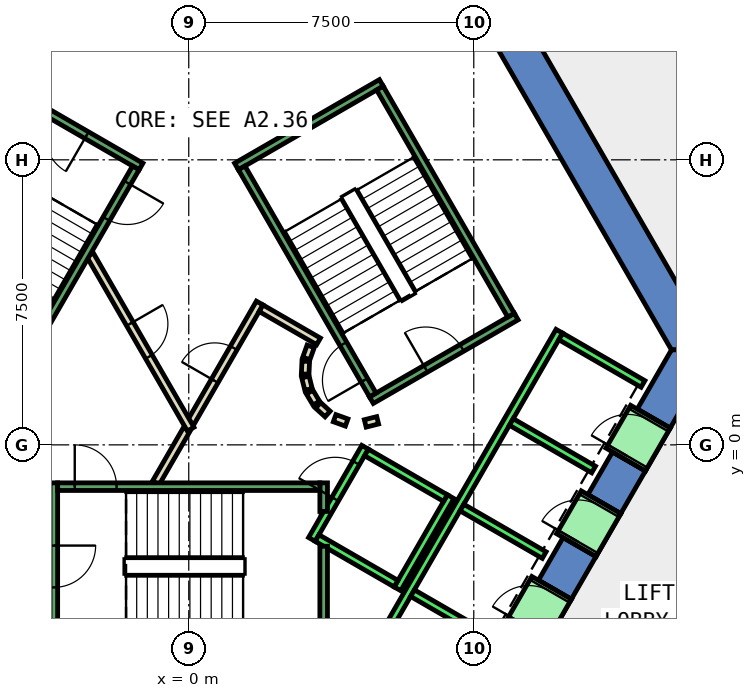
"""IFC4 building model, lengths in metres.
Left out: names, types, materials, properties, quantities, classifications, styles, units other than length and angle.
Written with IfcOpenShell. Run it as: python <this file> out.ifc"""

import sys

from ifc_helpers import new_model, si_unit, direction, frame, frame_2d, origin, place, context, subcontext, project, spatial, polyline, rectangle, outline, extrude, element, fill, save


model = new_model("IFC4")
c1 = context("Model", 3, precision=1e-05, world=origin(), true_north=direction((0.0, 1.0)))
c2 = subcontext(c1, "Body", "Model", "MODEL_VIEW")
j1 = project(units=[si_unit("LENGTHUNIT", "METRE"), si_unit("PLANEANGLEUNIT", "RADIAN")], contexts=[c1])
p1 = place(None, origin())
s1 = spatial("IfcSite", under=j1, at=p1, CompositionType="ELEMENT")
p2 = place(p1, origin())
s2 = spatial("IfcBuilding", under=s1, at=p2, CompositionType="ELEMENT")
p3 = place(p2, frame((0.0, 0.0, 176.0)))
s3 = spatial("IfcBuildingStorey", under=s2, at=p3, CompositionType="ELEMENT", Elevation=176.0)
p4 = place(p3, frame((0.0, 0.0, -0.4)))
e1 = element("IfcWall", 1, at=p4, inside=s3, PredefinedType="SHEAR", context=c2, shape_type="SweptSolid", body=[
    extrude(outline(polyline([(8.517, 11.748), (7.651, 11.248), (12.702, 2.5), (13.856, 2.5), (8.517, 11.748)])), origin(), (0.0, 0.0, 1.0), 4.2),
])
p5 = place(p3, frame((0.0, 0.0, -0.4)))
e2 = element("IfcWall", 2, at=p5, inside=s3, PredefinedType="SHEAR", context=c2, shape_type="SweptSolid", body=[
    extrude(outline(polyline([(10.717, -2.937), (9.851, -2.437), (9.201, -3.563), (10.067, -4.063), (10.717, -2.937)])), origin(), (0.0, 0.0, 1.0), 4.2),
])
p6 = place(p3, frame((0.0, 0.0, -0.4)))
e3 = element("IfcWall", 3, at=p6, inside=s3, PredefinedType="SHEAR", context=c2, shape_type="SweptSolid", body=[
    extrude(outline(polyline([(12.017, -0.686), (11.151, -0.186), (10.501, -1.311), (11.367, -1.811), (12.017, -0.686)])), origin(), (0.0, 0.0, 1.0), 4.2),
])
p7 = place(p3, frame((0.0, 0.0, -0.4)))
e4 = element("IfcWall", 4, at=p7, inside=s3, PredefinedType="SHEAR", context=c2, shape_type="SweptSolid", body=[
    extrude(outline(polyline([(11.801, 0.94), (12.667, 0.44), (13.856, 2.5), (12.702, 2.5), (11.801, 0.94)])), origin(), (0.0, 0.0, 1.0), 4.2),
])
p8 = place(p3, frame((0.0, 0.0, 3.6)))
e5 = element("IfcWall", 5, at=p8, inside=s3, PredefinedType="SHEAR", context=c2, shape_type="SweptSolid", body=[
    extrude(outline(polyline([(10.067, -4.063), (9.201, -3.563), (8.551, -4.689), (9.417, -5.189), (10.067, -4.063)])), origin(), (0.0, 0.0, 1.0), 0.2),
])
p9 = place(p3, frame((0.0, 0.0, 3.6)))
e6 = element("IfcWall", 6, at=p9, inside=s3, PredefinedType="SHEAR", context=c2, shape_type="SweptSolid", body=[
    extrude(outline(polyline([(11.367, -1.811), (10.501, -1.311), (9.851, -2.437), (10.717, -2.937), (11.367, -1.811)])), origin(), (0.0, 0.0, 1.0), 0.2),
])
p10 = place(p3, frame((0.0, 0.0, 3.6)))
e7 = element("IfcWall", 7, at=p10, inside=s3, PredefinedType="SHEAR", context=c2, shape_type="SweptSolid", body=[
    extrude(outline(polyline([(12.667, 0.44), (11.801, 0.94), (11.151, -0.186), (12.017, -0.686), (12.667, 0.44)])), origin(), (0.0, 0.0, 1.0), 0.2),
])
p11 = place(p3, frame((-0.866, -1.0, 0.0), z_axis=(0.0, 0.0, 1.0), x_axis=(0.500033287521, 0.866006184372, 0.0)))
e8 = element("IfcWall", 8, at=p11, inside=s3, PredefinedType="PARTITIONING", context=c2, shape_type="SweptSolid", body=[
    extrude(rectangle(XDim=1.632, YDim=0.2, at=frame_2d((0.816, 0.0))), origin(), (0.0, 0.0, 1.0), 3.75),
])
p12 = place(p3, frame((0.05, 0.587, 0.0), z_axis=(0.0, 0.0, 1.0), x_axis=(0.500028932171, 0.866008699143, 0.0)))
e9 = element("IfcWall", 9, at=p12, inside=s3, PredefinedType="PARTITIONING", context=c2, shape_type="SweptSolid", body=[
    extrude(rectangle(XDim=3.632, YDim=0.2, at=frame_2d((1.816, 0.0))), origin(), (0.0, 0.0, 1.0), 3.75),
])
p13 = place(p12, frame((1.266, 0.0, 0.0)))
e10 = element("IfcOpeningElement", 10, at=p13, cuts=e9, PredefinedType="OPENING", context=c2, shape_type="SweptSolid", body=[
    extrude(rectangle(XDim=1.0, YDim=2.1, at=frame_2d((0.5, 1.05))), frame((0.0, 0.11, 0.0), z_axis=(0.0, -1.0, 0.0), x_axis=(1.0, 0.0, 0.0)), (0.0, 0.0, 1.0), 0.22),
])
p14 = place(p3, frame((1.903, 3.595, 0.0), z_axis=(0.0, 0.0, 1.0), x_axis=(0.866239139897, -0.499629615326, 0.0)))
e11 = element("IfcWall", 11, at=p14, inside=s3, PredefinedType="PARTITIONING", context=c2, shape_type="SweptSolid", body=[
    extrude(rectangle(XDim=1.745, YDim=0.2, at=frame_2d((0.873, 0.0))), origin(), (0.0, 0.0, 1.0), 3.75),
])
p15 = place(p3, frame((3.208, 2.592, 0.0), z_axis=(0.0, 0.0, 1.0), x_axis=(-0.337388820924, -0.941365382578, 0.0)))
e12 = element("IfcWall", 12, at=p15, inside=s3, PredefinedType="PARTITIONING", context=c2, shape_type="SweptSolid", body=[
    extrude(rectangle(XDim=0.338, YDim=0.2, at=frame_2d((0.169, 0.0))), origin(), (0.0, 0.0, 1.0), 3.75),
])
p16 = place(p3, frame((3.079, 2.199, 0.0), z_axis=(0.0, 0.0, 1.0), x_axis=(-0.047771483479, -0.998858290933, 0.0)))
e13 = element("IfcWall", 13, at=p16, inside=s3, PredefinedType="PARTITIONING", context=c2, shape_type="SweptSolid", body=[
    extrude(rectangle(XDim=0.337, YDim=0.2, at=frame_2d((0.169, 0.0))), origin(), (0.0, 0.0, 1.0), 3.75),
])
p17 = place(p3, frame((3.07, 1.786, 0.0), z_axis=(0.0, 0.0, 1.0), x_axis=(0.242705583207, -0.970099994784, 0.0)))
e14 = element("IfcWall", 14, at=p17, inside=s3, PredefinedType="PARTITIONING", context=c2, shape_type="SweptSolid", body=[
    extrude(rectangle(XDim=0.338, YDim=0.2, at=frame_2d((0.169, 0.0))), origin(), (0.0, 0.0, 1.0), 3.75),
])
for number, where, z_axis, x_axis in (
    (15, (3.182, 1.388, 0.0), (0.0, 0.0, 1.0), (0.512, -0.859, 0.0)),
    (16, (3.404, 1.039, 0.0), (0.0, 0.0, 1.0), (0.74, -0.672, 0.0)),
):
    element("IfcWall", number, at=place(p3, frame(where, z_axis=z_axis, x_axis=x_axis)), inside=s3, PredefinedType="PARTITIONING", context=c2, shape_type="SweptSolid", body=[
        extrude(rectangle(XDim=0.338, YDim=0.2, at=frame_2d((0.169, 0.0))), origin(), (0.0, 0.0, 1.0), 3.75),
    ])
p18 = place(p3, frame((3.838, 0.702, 0.0), z_axis=(0.0, 0.0, 1.0), x_axis=(0.941035081519, -0.338308993895, 0.0)))
e17 = element("IfcWall", 17, at=p18, inside=s3, PredefinedType="PARTITIONING", context=c2, shape_type="SweptSolid", body=[
    extrude(rectangle(XDim=0.337, YDim=0.2, at=frame_2d((0.168, 0.0))), origin(), (0.0, 0.0, 1.0), 3.75),
])
p19 = place(p3, frame((4.644, 0.564, 0.0), z_axis=(0.0, 0.0, 1.0), x_axis=(0.969929076366, 0.243387729394, 0.0)))
e18 = element("IfcWall", 18, at=p19, inside=s3, PredefinedType="PARTITIONING", context=c2, shape_type="SweptSolid", body=[
    extrude(rectangle(XDim=0.337, YDim=0.2, at=frame_2d((0.168, 0.0))), origin(), (0.0, 0.0, 1.0), 3.75),
])
p20 = place(p3, frame((-2.598, 5.0, 0.0), z_axis=(0.0, 0.0, 1.0), x_axis=(0.49995654735, -0.86605048973, 0.0)))
e19 = element("IfcWall", 19, at=p20, inside=s3, PredefinedType="PARTITIONING", context=c2, shape_type="SweptSolid", body=[
    extrude(rectangle(XDim=5.296, YDim=0.2, at=frame_2d((2.648, 0.0))), origin(), (0.0, 0.0, 1.0), 3.75),
])
p21 = place(p20, frame((2.098, 0.0, 0.0)))
e20 = element("IfcOpeningElement", 20, at=p21, cuts=e19, PredefinedType="OPENING", context=c2, shape_type="SweptSolid", body=[
    extrude(rectangle(XDim=1.0, YDim=2.1, at=frame_2d((0.5, 1.05))), frame((0.0, 0.11, 0.0), z_axis=(0.0, -1.0, 0.0), x_axis=(1.0, 0.0, 0.0)), (0.0, 0.0, 1.0), 0.22),
])
p22 = place(p3, frame((18.03, 2.13, 0.0), z_axis=(0.0, 0.0, 1.0), x_axis=(-0.499919790729, -0.866071707676, 0.0)))
e21 = element("IfcWall", 21, at=p22, inside=s3, PredefinedType="PARTITIONING", context=c2, shape_type="SweptSolid", body=[
    extrude(rectangle(XDim=10.46, YDim=0.2, at=frame_2d((5.23, 0.0))), origin(), (0.0, 0.0, 1.0), 3.75),
])
p23 = place(p3, frame((3.24, -2.488, 0.0), z_axis=(0.0, 0.0, 1.0), x_axis=(0.49994636267, 0.866056369097, 0.0)))
e22 = element("IfcWall", 22, at=p23, inside=s3, PredefinedType="STANDARD", context=c2, shape_type="SweptSolid", body=[
    extrude(rectangle(XDim=2.8, YDim=0.2, at=frame_2d((1.4, 0.0))), origin(), (0.0, 0.0, 1.0), 3.75),
])
p24 = place(p23, frame((1.225, 0.0, 0.0)))
e23 = element("IfcOpeningElement", 23, at=p24, cuts=e22, PredefinedType="OPENING", context=c2, shape_type="SweptSolid", body=[
    extrude(rectangle(XDim=1.1, YDim=2.1, at=frame_2d((0.55, 1.05))), frame((0.0, 0.11, 0.0), z_axis=(0.0, -1.0, 0.0), x_axis=(1.0, 0.0, 0.0)), (0.0, 0.0, 1.0), 0.22),
])
p25 = place(p3, frame((5.492, -3.788, 0.0), z_axis=(0.0, 0.0, 1.0), x_axis=(0.500011755427, 0.866018616679, 0.0)))
e24 = element("IfcWall", 24, at=p25, inside=s3, PredefinedType="STANDARD", context=c2, shape_type="SweptSolid", body=[
    extrude(rectangle(XDim=2.8, YDim=0.2, at=frame_2d((1.4, 0.0))), origin(), (0.0, 0.0, 1.0), 3.75),
])
p26 = place(p3, frame((3.377, -2.452, 0.0), z_axis=(0.0, 0.0, 1.0), x_axis=(0.865955154139, -0.50012165622, 0.0)))
e25 = element("IfcWall", 25, at=p26, inside=s3, PredefinedType="STANDARD", context=c2, shape_type="SweptSolid", body=[
    extrude(rectangle(XDim=2.4, YDim=0.2, at=frame_2d((1.2, 0.0))), origin(), (0.0, 0.0, 1.0), 3.75),
])
p27 = place(p3, frame((4.677, -0.2, 0.0), z_axis=(0.0, 0.0, 1.0), x_axis=(0.865973769406, -0.500089422704, 0.0)))
e26 = element("IfcWall", 26, at=p27, inside=s3, PredefinedType="STANDARD", context=c2, shape_type="SweptSolid", body=[
    extrude(rectangle(XDim=2.399, YDim=0.2, at=frame_2d((1.2, 0.0))), origin(), (0.0, 0.0, 1.0), 3.75),
])
p28 = place(p3, frame((4.451, -6.19, 0.0), z_axis=(0.0, 0.0, 1.0), x_axis=(0.50000090737, 0.866024879913, 0.0)))
e27 = element("IfcWall", 27, at=p28, inside=s3, PredefinedType="STANDARD", context=c2, shape_type="SweptSolid", body=[
    extrude(rectangle(XDim=10.6, YDim=0.2, at=frame_2d((5.3, 0.0))), origin(), (0.0, 0.0, 1.0), 3.75),
])
for number, where, z_axis, x_axis in (
    (28, (5.888, -3.902, 0.0), (0.0, 0.0, 1.0), (0.866, -0.5, 0.0)),
    (29, (7.188, -1.65, 0.0), (0.0, 0.0, 1.0), (0.866, -0.5, 0.0)),
    (30, (8.488, 0.602, 0.0), (0.0, 0.0, 1.0), (0.866, -0.5, 0.0)),
):
    element("IfcWall", number, at=place(p3, frame(where, z_axis=z_axis, x_axis=x_axis)), inside=s3, PredefinedType="STANDARD", context=c2, shape_type="SweptSolid", body=[
        extrude(rectangle(XDim=2.5, YDim=0.2, at=frame_2d((1.25, 0.0))), origin(), (0.0, 0.0, 1.0), 3.75),
    ])
p29 = place(p3, frame((9.788, 2.853, 0.0), z_axis=(0.0, 0.0, 1.0), x_axis=(0.865998541277, -0.500046524342, 0.0)))
e31 = element("IfcWall", 31, at=p29, inside=s3, PredefinedType="STANDARD", context=c2, shape_type="SweptSolid", body=[
    extrude(rectangle(XDim=2.5, YDim=0.2, at=frame_2d((1.25, 0.0))), origin(), (0.0, 0.0, 1.0), 3.75),
])
p30 = place(p3, frame((8.898, -4.889, 0.0), z_axis=(0.0, 0.0, 1.0), x_axis=(0.500036693733, 0.866004217611, 0.0)))
e32 = element("IfcWall", 32, at=p30, inside=s3, PredefinedType="STANDARD", context=c2, shape_type="SweptSolid", body=[
    extrude(rectangle(XDim=1.3, YDim=1.2, at=frame_2d((0.65, 0.0))), origin(), (0.0, 0.0, 1.0), 2.4),
])
p31 = place(p30, frame((0.1, 0.0, 0.0)))
e33 = element("IfcOpeningElement", 33, at=p31, cuts=e32, PredefinedType="OPENING", context=c2, shape_type="SweptSolid", body=[
    extrude(rectangle(XDim=1.1, YDim=2.3, at=frame_2d((0.55, 1.15))), frame((0.0, 0.61, 0.0), z_axis=(0.0, -1.0, 0.0), x_axis=(1.0, 0.0, 0.0)), (0.0, 0.0, 1.0), 1.22),
])
p32 = place(p3, frame((10.198, -2.637, 0.0), z_axis=(0.0, 0.0, 1.0), x_axis=(0.49989585183, 0.866085525409, 0.0)))
e34 = element("IfcWall", 34, at=p32, inside=s3, PredefinedType="STANDARD", context=c2, shape_type="SweptSolid", body=[
    extrude(rectangle(XDim=1.3, YDim=1.2, at=frame_2d((0.65, 0.0))), origin(), (0.0, 0.0, 1.0), 2.4),
])
p33 = place(p32, frame((0.1, 0.0, 0.0)))
e35 = element("IfcOpeningElement", 35, at=p33, cuts=e34, PredefinedType="OPENING", context=c2, shape_type="SweptSolid", body=[
    extrude(rectangle(XDim=1.1, YDim=2.3, at=frame_2d((0.55, 1.15))), frame((0.0, 0.61, 0.0), z_axis=(0.0, -1.0, 0.0), x_axis=(1.0, 0.0, 0.0)), (0.0, 0.0, 1.0), 1.22),
])
p34 = place(p3, frame((11.498, -0.385, 0.0), z_axis=(0.0, 0.0, 1.0), x_axis=(0.500221244143, 0.865897630733, 0.0)))
e36 = element("IfcWall", 36, at=p34, inside=s3, PredefinedType="STANDARD", context=c2, shape_type="SweptSolid", body=[
    extrude(rectangle(XDim=1.299, YDim=1.2, at=frame_2d((0.65, 0.0))), origin(), (0.0, 0.0, 1.0), 2.4),
])
p35 = place(p34, frame((0.1, 0.0, 0.0)))
e37 = element("IfcOpeningElement", 37, at=p35, cuts=e36, PredefinedType="OPENING", context=c2, shape_type="SweptSolid", body=[
    extrude(rectangle(XDim=1.1, YDim=2.3, at=frame_2d((0.55, 1.15))), frame((0.0, 0.61, 0.0), z_axis=(0.0, -1.0, 0.0), x_axis=(1.0, 0.0, 0.0)), (0.0, 0.0, 1.0), 1.22),
])
p36 = place(p3, frame((-3.55, -1.0, 0.0), z_axis=(0.0, 0.0, 1.0), x_axis=(0.0, -1.0, 0.0)))
e38 = element("IfcWall", 38, at=p36, inside=s3, PredefinedType="STANDARD", context=c2, shape_type="SweptSolid", body=[
    extrude(rectangle(XDim=4.4, YDim=0.2, at=frame_2d((2.2, 0.0))), origin(), (0.0, 0.0, 1.0), 3.75),
])
p37 = place(p36, frame((1.65, 0.0, 0.0)))
e39 = element("IfcOpeningElement", 39, at=p37, cuts=e38, PredefinedType="OPENING", context=c2, shape_type="SweptSolid", body=[
    extrude(rectangle(XDim=1.1, YDim=2.2, at=frame_2d((0.55, 1.1))), frame((0.0, 0.11, 0.0), z_axis=(0.0, -1.0, 0.0), x_axis=(1.0, 0.0, 0.0)), (0.0, 0.0, 1.0), 0.22),
])
p38 = place(p3, frame((3.55, -2.667, 0.0), z_axis=(0.0, 0.0, 1.0), x_axis=(0.0, -1.0, 0.0)))
e40 = element("IfcWall", 40, at=p38, inside=s3, PredefinedType="STANDARD", context=c2, shape_type="SweptSolid", body=[
    extrude(rectangle(XDim=2.733, YDim=0.2, at=frame_2d((1.366, 0.0))), origin(), (0.0, 0.0, 1.0), 3.75),
])
p39 = place(p3, frame((3.55, -1.0, 0.0), z_axis=(0.0, 0.0, 1.0), x_axis=(0.0, -1.0, 0.0)))
e41 = element("IfcWall", 41, at=p39, inside=s3, PredefinedType="STANDARD", context=c2, shape_type="SweptSolid", body=[
    extrude(rectangle(XDim=0.751, YDim=0.2, at=frame_2d((0.375, 0.0))), origin(), (0.0, 0.0, 1.0), 3.75),
])
p40 = place(p3, frame((-3.45, -1.1, 0.0), z_axis=(0.0, 0.0, 1.0), x_axis=(1.0, 0.0, 0.0)))
e42 = element("IfcWall", 42, at=p40, inside=s3, PredefinedType="STANDARD", context=c2, shape_type="SweptSolid", body=[
    extrude(rectangle(XDim=6.9, YDim=0.2, at=frame_2d((3.45, 0.0))), origin(), (0.0, 0.0, 1.0), 3.75),
])
p41 = place(p40, frame((0.45, 0.0, 0.0)))
e43 = element("IfcOpeningElement", 43, at=p41, cuts=e42, PredefinedType="OPENING", context=c2, shape_type="SweptSolid", body=[
    extrude(rectangle(XDim=1.1, YDim=2.2, at=frame_2d((0.55, 1.1))), frame((0.0, 0.11, 0.0), z_axis=(0.0, -1.0, 0.0), x_axis=(1.0, 0.0, 0.0)), (0.0, 0.0, 1.0), 0.22),
])
p42 = place(p3, frame((4.806, 1.176, 0.0), z_axis=(0.0, 0.0, 1.0), x_axis=(0.866059941101, 0.499940174841, 0.0)))
e44 = element("IfcWall", 44, at=p42, inside=s3, PredefinedType="STANDARD", context=c2, shape_type="SweptSolid", body=[
    extrude(rectangle(XDim=4.4, YDim=0.2, at=frame_2d((2.2, 0.0))), origin(), (0.0, 0.0, 1.0), 3.75),
])
p43 = place(p42, frame((1.65, 0.0, 0.0)))
e45 = element("IfcOpeningElement", 45, at=p43, cuts=e44, PredefinedType="OPENING", context=c2, shape_type="SweptSolid", body=[
    extrude(rectangle(XDim=1.1, YDim=2.2, at=frame_2d((0.55, 1.1))), frame((0.0, 0.11, 0.0), z_axis=(0.0, -1.0, 0.0), x_axis=(1.0, 0.0, 0.0)), (0.0, 0.0, 1.0), 0.22),
])
p44 = place(p3, frame((1.256, 7.324, 0.0), z_axis=(0.0, 0.0, 1.0), x_axis=(0.866046073146, 0.499964197906, 0.0)))
e46 = element("IfcWall", 46, at=p44, inside=s3, PredefinedType="STANDARD", context=c2, shape_type="SweptSolid", body=[
    extrude(rectangle(XDim=4.4, YDim=0.2, at=frame_2d((2.2, 0.0))), origin(), (0.0, 0.0, 1.0), 3.75),
])
p45 = place(p3, frame((4.843, 1.312, 0.0), z_axis=(0.0, 0.0, 1.0), x_axis=(-0.499963383562, 0.866046543262, 0.0)))
e47 = element("IfcWall", 47, at=p45, inside=s3, PredefinedType="STANDARD", context=c2, shape_type="SweptSolid", body=[
    extrude(rectangle(XDim=6.9, YDim=0.2, at=frame_2d((3.45, 0.0))), origin(), (0.0, 0.0, 1.0), 3.75),
])
p46 = place(p45, frame((0.45, 0.0, 0.0)))
e48 = element("IfcOpeningElement", 48, at=p46, cuts=e47, PredefinedType="OPENING", context=c2, shape_type="SweptSolid", body=[
    extrude(rectangle(XDim=1.1, YDim=2.2, at=frame_2d((0.55, 1.1))), frame((0.0, 0.11, 0.0), z_axis=(0.0, -1.0, 0.0), x_axis=(1.0, 0.0, 0.0)), (0.0, 0.0, 1.0), 0.22),
])
p47 = place(p3, frame((8.48, 3.412, 0.0), z_axis=(0.0, 0.0, 1.0), x_axis=(-0.499978703459, 0.866037698999, 0.0)))
e49 = element("IfcWall", 49, at=p47, inside=s3, PredefinedType="STANDARD", context=c2, shape_type="SweptSolid", body=[
    extrude(rectangle(XDim=6.9, YDim=0.2, at=frame_2d((3.45, 0.0))), origin(), (0.0, 0.0, 1.0), 3.75),
])
p48 = place(p3, frame((-1.256, 7.324, 0.0), z_axis=(0.0, 0.0, 1.0), x_axis=(-0.866046073146, 0.499964197906, 0.0)))
e50 = element("IfcWall", 50, at=p48, inside=s3, PredefinedType="STANDARD", context=c2, shape_type="SweptSolid", body=[
    extrude(rectangle(XDim=4.4, YDim=0.2, at=frame_2d((2.2, 0.0))), origin(), (0.0, 0.0, 1.0), 3.75),
])
p49 = place(p48, frame((1.65, 0.0, 0.0)))
e51 = element("IfcOpeningElement", 51, at=p49, cuts=e50, PredefinedType="OPENING", context=c2, shape_type="SweptSolid", body=[
    extrude(rectangle(XDim=1.1, YDim=2.2, at=frame_2d((0.55, 1.1))), frame((0.0, 0.11, 0.0), z_axis=(0.0, -1.0, 0.0), x_axis=(1.0, 0.0, 0.0)), (0.0, 0.0, 1.0), 0.22),
])
p50 = place(p3, frame((-1.393, 7.288, 0.0), z_axis=(0.0, 0.0, 1.0), x_axis=(-0.499963383562, -0.866046543262, 0.0)))
e52 = element("IfcWall", 52, at=p50, inside=s3, PredefinedType="STANDARD", context=c2, shape_type="SweptSolid", body=[
    extrude(rectangle(XDim=6.9, YDim=0.2, at=frame_2d((3.45, 0.0))), origin(), (0.0, 0.0, 1.0), 3.75),
])
p51 = place(p50, frame((0.45, 0.0, 0.0)))
e53 = element("IfcOpeningElement", 53, at=p51, cuts=e52, PredefinedType="OPENING", context=c2, shape_type="SweptSolid", body=[
    extrude(rectangle(XDim=1.1, YDim=2.2, at=frame_2d((0.55, 1.1))), frame((0.0, 0.11, 0.0), z_axis=(0.0, -1.0, 0.0), x_axis=(1.0, 0.0, 0.0)), (0.0, 0.0, 1.0), 0.22),
])
p52 = place(p13, origin())
e54 = element("IfcDoor", 54, at=p52, inside=s3, OperationType="SINGLE_SWING_RIGHT", PredefinedType="DOOR", context=c2, shape_type="SweptSolid", body=[
    extrude(rectangle(XDim=1.0, YDim=2.1, at=frame_2d((0.5, 1.05))), frame((0.0, 0.025, 0.0), z_axis=(0.0, -1.0, 0.0), x_axis=(1.0, 0.0, 0.0)), (0.0, 0.0, 1.0), 0.05),
])
fill(e10, e54)
p53 = place(p21, origin())
e55 = element("IfcDoor", 55, at=p53, inside=s3, OperationType="SINGLE_SWING_RIGHT", PredefinedType="DOOR", context=c2, shape_type="SweptSolid", body=[
    extrude(rectangle(XDim=1.0, YDim=2.1, at=frame_2d((0.5, 1.05))), frame((0.0, 0.025, 0.0), z_axis=(0.0, -1.0, 0.0), x_axis=(1.0, 0.0, 0.0)), (0.0, 0.0, 1.0), 0.05),
])
fill(e20, e55)
p54 = place(p31, origin())
e56 = element("IfcDoor", 56, at=p54, inside=s3, OperationType="SLIDING_TO_LEFT", PredefinedType="DOOR", context=c2, shape_type="SweptSolid", body=[
    extrude(rectangle(XDim=1.1, YDim=2.3, at=frame_2d((0.55, 1.15))), frame((0.0, 0.025, 0.0), z_axis=(0.0, -1.0, 0.0), x_axis=(1.0, 0.0, 0.0)), (0.0, 0.0, 1.0), 0.05),
])
fill(e33, e56)
p55 = place(p33, origin())
e57 = element("IfcDoor", 57, at=p55, inside=s3, OperationType="SLIDING_TO_LEFT", PredefinedType="DOOR", context=c2, shape_type="SweptSolid", body=[
    extrude(rectangle(XDim=1.1, YDim=2.3, at=frame_2d((0.55, 1.15))), frame((0.0, 0.025, 0.0), z_axis=(0.0, -1.0, 0.0), x_axis=(1.0, 0.0, 0.0)), (0.0, 0.0, 1.0), 0.05),
])
fill(e35, e57)
p56 = place(p35, origin())
e58 = element("IfcDoor", 58, at=p56, inside=s3, OperationType="SLIDING_TO_LEFT", PredefinedType="DOOR", context=c2, shape_type="SweptSolid", body=[
    extrude(rectangle(XDim=1.1, YDim=2.3, at=frame_2d((0.55, 1.15))), frame((0.0, 0.025, 0.0), z_axis=(0.0, -1.0, 0.0), x_axis=(1.0, 0.0, 0.0)), (0.0, 0.0, 1.0), 0.05),
])
fill(e37, e58)
p57 = place(p24, origin())
e59 = element("IfcDoor", 59, at=p57, inside=s3, OperationType="SLIDING_TO_LEFT", PredefinedType="DOOR", context=c2, shape_type="SweptSolid", body=[
    extrude(rectangle(XDim=1.1, YDim=2.1, at=frame_2d((0.55, 1.05))), frame((0.0, 0.025, 0.0), z_axis=(0.0, -1.0, 0.0), x_axis=(1.0, 0.0, 0.0)), (0.0, 0.0, 1.0), 0.05),
])
fill(e23, e59)
p58 = place(p41, origin())
e60 = element("IfcDoor", 60, at=p58, inside=s3, OperationType="SINGLE_SWING_LEFT", PredefinedType="DOOR", context=c2, shape_type="SweptSolid", body=[
    extrude(rectangle(XDim=1.1, YDim=2.2, at=frame_2d((0.55, 1.1))), frame((0.0, 0.025, 0.0), z_axis=(0.0, -1.0, 0.0), x_axis=(1.0, 0.0, 0.0)), (0.0, 0.0, 1.0), 0.05),
])
fill(e43, e60)
p59 = place(p37, origin())
e61 = element("IfcDoor", 61, at=p59, inside=s3, OperationType="SINGLE_SWING_LEFT", PredefinedType="DOOR", context=c2, shape_type="SweptSolid", body=[
    extrude(rectangle(XDim=1.1, YDim=2.2, at=frame_2d((0.55, 1.1))), frame((0.0, 0.025, 0.0), z_axis=(0.0, -1.0, 0.0), x_axis=(1.0, 0.0, 0.0)), (0.0, 0.0, 1.0), 0.05),
])
fill(e39, e61)
p60 = place(p46, origin())
e62 = element("IfcDoor", 62, at=p60, inside=s3, OperationType="SINGLE_SWING_LEFT", PredefinedType="DOOR", context=c2, shape_type="SweptSolid", body=[
    extrude(rectangle(XDim=1.1, YDim=2.2, at=frame_2d((0.55, 1.1))), frame((0.0, 0.025, 0.0), z_axis=(0.0, -1.0, 0.0), x_axis=(1.0, 0.0, 0.0)), (0.0, 0.0, 1.0), 0.05),
])
fill(e48, e62)
p61 = place(p43, origin())
e63 = element("IfcDoor", 63, at=p61, inside=s3, OperationType="SINGLE_SWING_LEFT", PredefinedType="DOOR", context=c2, shape_type="SweptSolid", body=[
    extrude(rectangle(XDim=1.1, YDim=2.2, at=frame_2d((0.55, 1.1))), frame((0.0, 0.025, 0.0), z_axis=(0.0, -1.0, 0.0), x_axis=(1.0, 0.0, 0.0)), (0.0, 0.0, 1.0), 0.05),
])
fill(e45, e63)
p62 = place(p51, origin())
e64 = element("IfcDoor", 64, at=p62, inside=s3, OperationType="SINGLE_SWING_LEFT", PredefinedType="DOOR", context=c2, shape_type="SweptSolid", body=[
    extrude(rectangle(XDim=1.1, YDim=2.2, at=frame_2d((0.55, 1.1))), frame((0.0, 0.025, 0.0), z_axis=(0.0, -1.0, 0.0), x_axis=(1.0, 0.0, 0.0)), (0.0, 0.0, 1.0), 0.05),
])
fill(e53, e64)
p63 = place(p49, origin())
e65 = element("IfcDoor", 65, at=p63, inside=s3, OperationType="SINGLE_SWING_LEFT", PredefinedType="DOOR", context=c2, shape_type="SweptSolid", body=[
    extrude(rectangle(XDim=1.1, YDim=2.2, at=frame_2d((0.55, 1.1))), frame((0.0, 0.025, 0.0), z_axis=(0.0, -1.0, 0.0), x_axis=(1.0, 0.0, 0.0)), (0.0, 0.0, 1.0), 0.05),
])
fill(e51, e65)
save(model, sys.argv[1])
